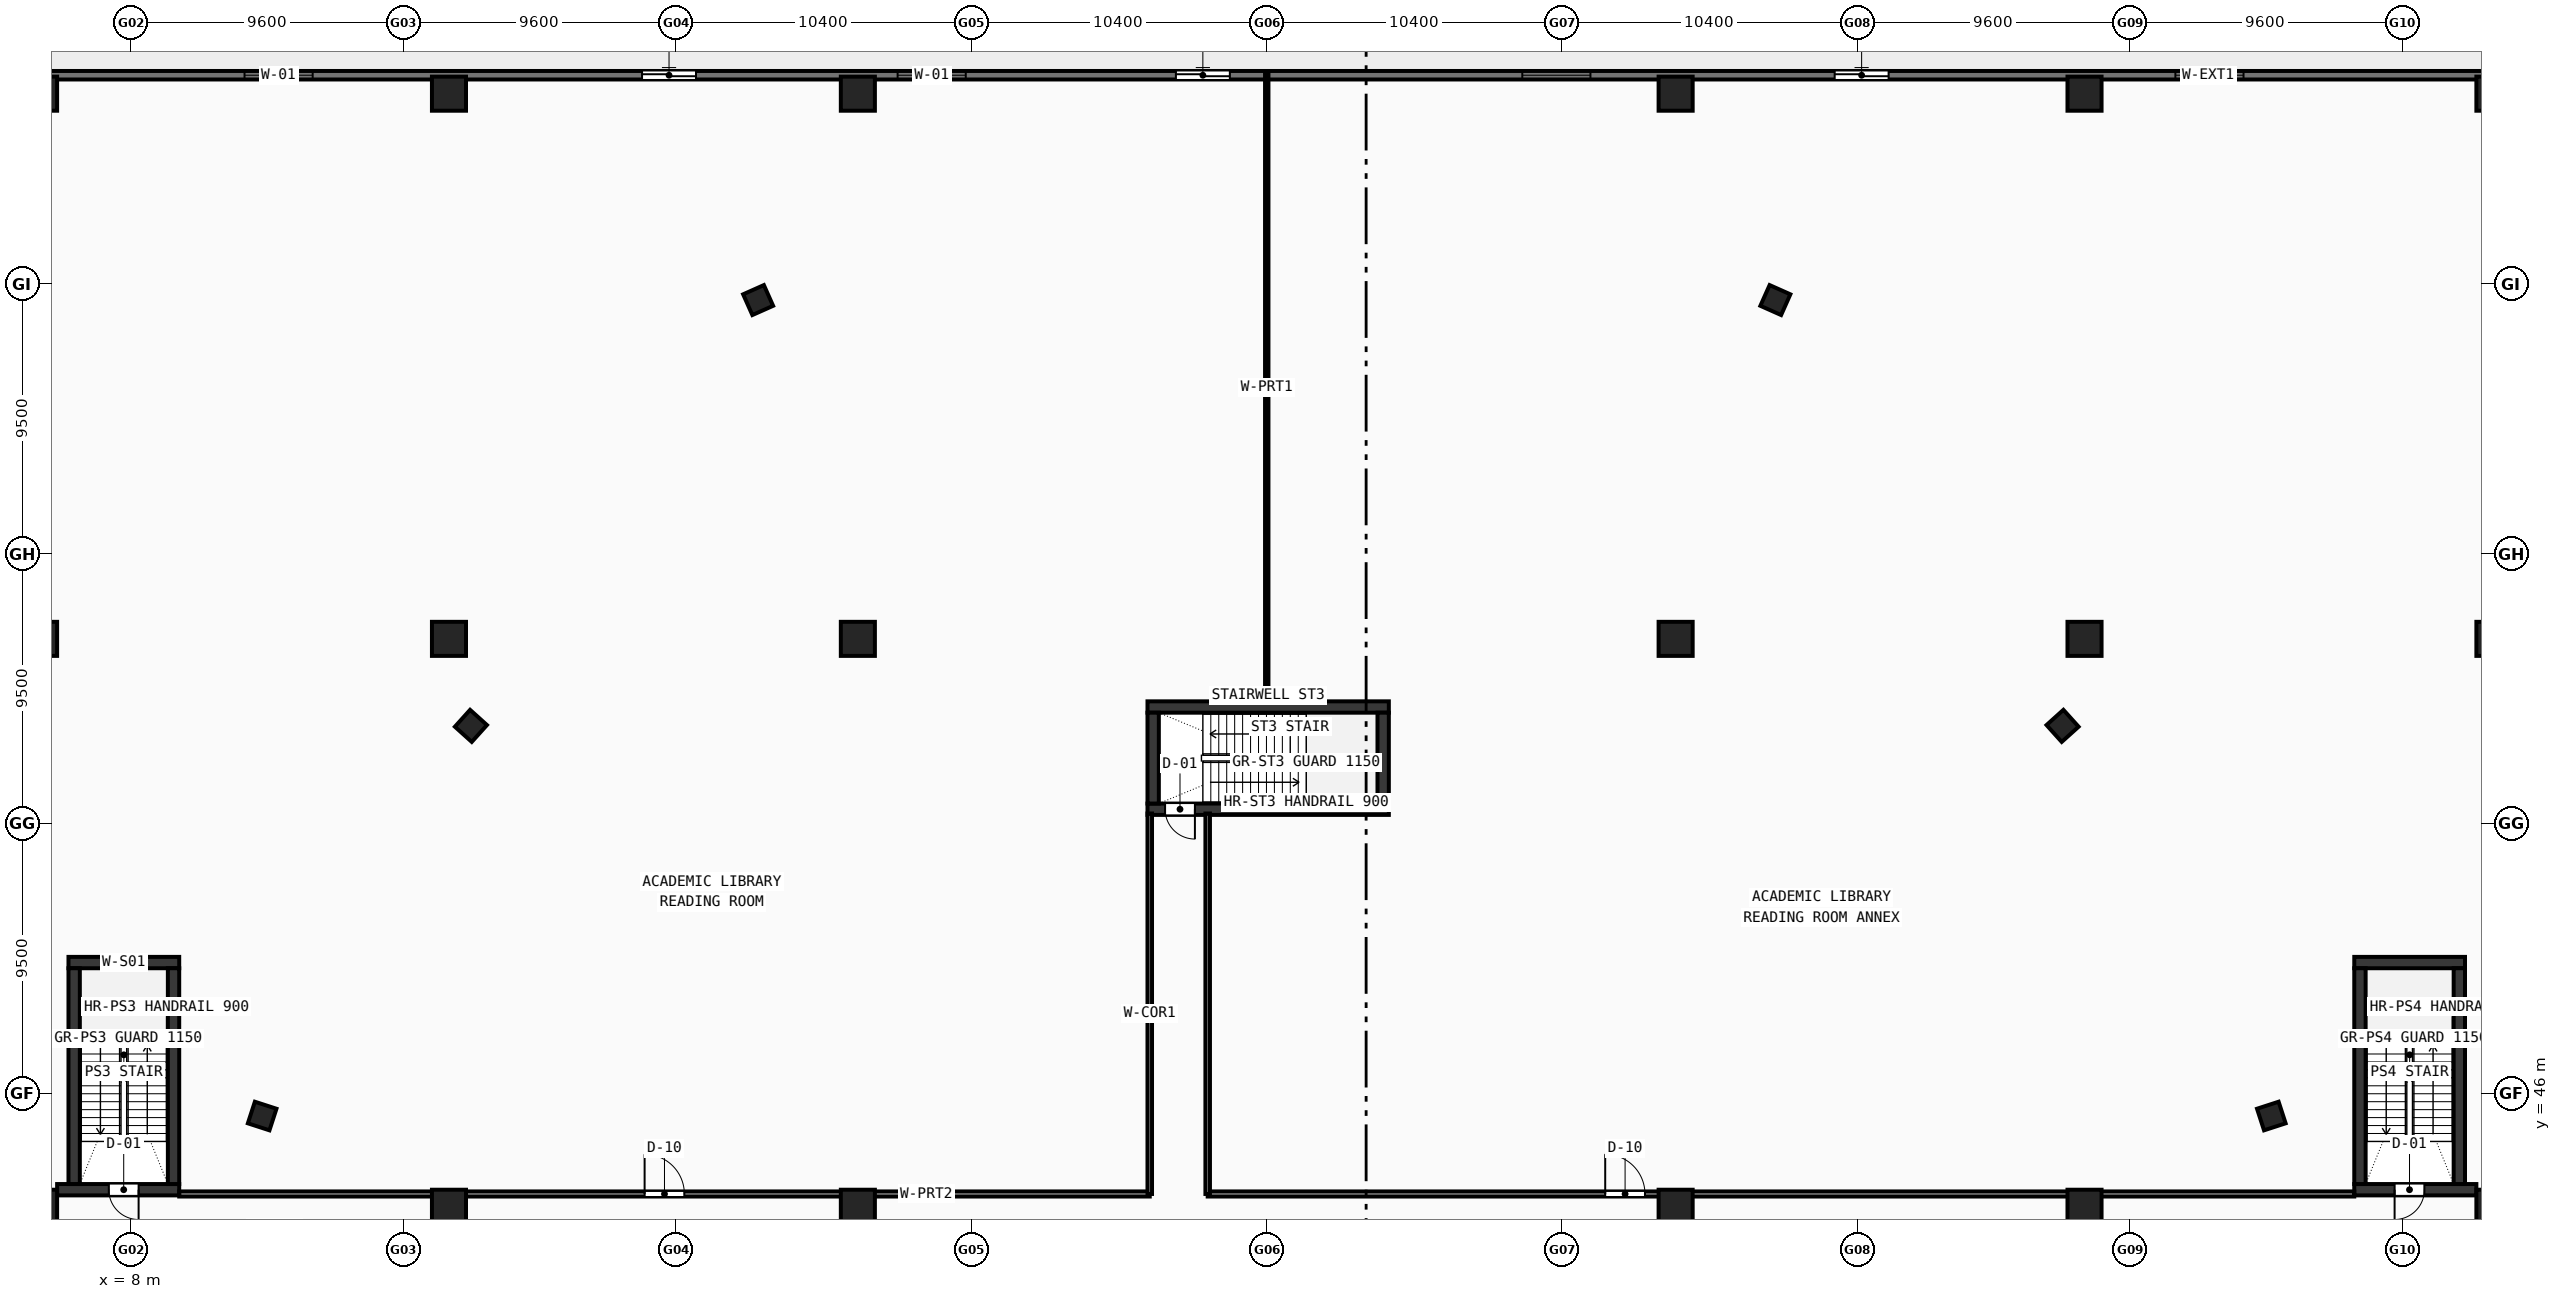
"""IFC4 building model, lengths in metres.
Left out: names, types, materials, properties, quantities, classifications, styles, units other than length and angle.
Written with IfcOpenShell. Run it as: python <this file> out.ifc"""

import sys

from ifc_helpers import new_model, si_unit, direction, frame, frame_2d, origin, origin_with_axes, origin_2d, place, context, subcontext, project, spatial, rectangle, hollow_rectangle, extrude, source, transform, mapped, element, fill, save


model = new_model("IFC4")
c1 = context("Model", 3, precision=1e-05, world=origin(), true_north=direction((0.0, 1.0)))
c2 = subcontext(c1, "Body", "Model", "MODEL_VIEW")
j1 = project(units=[si_unit("LENGTHUNIT", "METRE"), si_unit("PLANEANGLEUNIT", "RADIAN")], contexts=[c1])
p1 = place(None, origin())
s1 = spatial("IfcSite", under=j1, at=p1, CompositionType="ELEMENT")
p2 = place(p1, origin())
s2 = spatial("IfcBuilding", under=s1, at=p2, CompositionType="ELEMENT")
p3 = place(p2, frame((0.0, 0.0, 9.6)))
s3 = spatial("IfcBuildingStorey", under=s2, at=p3, CompositionType="ELEMENT", Elevation=9.6)
p4 = place(p3, frame((5.8, 50.6, 0.0), z_axis=(0.0, 0.0, 1.0), x_axis=(1.0, 0.0, 0.0)))
e1 = element("IfcWall", 1, at=p4, inside=s3, PredefinedType="SHEAR", context=c2, shape_type="SweptSolid", body=[
    extrude(rectangle(XDim=3.9, YDim=0.4, at=frame_2d((1.95, 0.0))), origin(), (0.0, 0.0, 1.0), 4.52),
])
p5 = place(p3, frame((5.4, 42.6, 0.0), z_axis=(0.0, 0.0, 1.0), x_axis=(1.0, 0.0, 0.0)))
e2 = element("IfcWall", 2, at=p5, inside=s3, PredefinedType="SHEAR", context=c2, shape_type="SweptSolid", body=[
    extrude(rectangle(XDim=4.3, YDim=0.4, at=frame_2d((2.15, 0.0))), origin(), (0.0, 0.0, 1.0), 4.52),
])
p6 = place(p5, frame((1.82, 0.0, 0.0)))
e3 = element("IfcOpeningElement", 3, at=p6, cuts=e2, PredefinedType="OPENING", context=c2, shape_type="SweptSolid", body=[
    extrude(rectangle(XDim=1.05, YDim=2.1, at=frame_2d((0.525, 1.05))), frame((0.0, 0.21, 0.0), z_axis=(0.0, -1.0, 0.0), x_axis=(1.0, 0.0, 0.0)), (0.0, 0.0, 1.0), 0.42),
])
for number, where, z_axis, x_axis in (
    (4, (6.0, 42.8, 0.0), (0.0, 0.0, 1.0), (0.0, 1.0, 0.0)),
    (5, (9.5, 42.8, 0.0), (0.0, 0.0, 1.0), (0.0, 1.0, 0.0)),
):
    element("IfcWall", number, at=place(p3, frame(where, z_axis=z_axis, x_axis=x_axis)), inside=s3, PredefinedType="SHEAR", context=c2, shape_type="SweptSolid", body=[
        extrude(rectangle(XDim=7.6, YDim=0.4, at=frame_2d((3.8, 0.0))), origin(), (0.0, 0.0, 1.0), 4.52),
    ])
p7 = place(p3, frame((86.3, 50.6, 0.0), z_axis=(0.0, 0.0, 1.0), x_axis=(1.0, 0.0, 0.0)))
e6 = element("IfcWall", 6, at=p7, inside=s3, PredefinedType="SHEAR", context=c2, shape_type="SweptSolid", body=[
    extrude(rectangle(XDim=3.9, YDim=0.4, at=frame_2d((1.95, 0.0))), origin(), (0.0, 0.0, 1.0), 4.52),
])
p8 = place(p3, frame((86.3, 42.6, 0.0), z_axis=(0.0, 0.0, 1.0), x_axis=(1.0, 0.0, 0.0)))
e7 = element("IfcWall", 7, at=p8, inside=s3, PredefinedType="SHEAR", context=c2, shape_type="SweptSolid", body=[
    extrude(rectangle(XDim=4.3, YDim=0.4, at=frame_2d((2.15, 0.0))), origin(), (0.0, 0.0, 1.0), 4.52),
])
p9 = place(p8, frame((1.42, 0.0, 0.0)))
e8 = element("IfcOpeningElement", 8, at=p9, cuts=e7, PredefinedType="OPENING", context=c2, shape_type="SweptSolid", body=[
    extrude(rectangle(XDim=1.05, YDim=2.1, at=frame_2d((0.525, 1.05))), frame((0.0, 0.21, 0.0), z_axis=(0.0, -1.0, 0.0), x_axis=(1.0, 0.0, 0.0)), (0.0, 0.0, 1.0), 0.42),
])
for number, where, z_axis, x_axis in (
    (9, (86.5, 42.8, 0.0), (0.0, 0.0, 1.0), (0.0, 1.0, 0.0)),
    (10, (90.0, 42.8, 0.0), (0.0, 0.0, 1.0), (0.0, 1.0, 0.0)),
):
    element("IfcWall", number, at=place(p3, frame(where, z_axis=z_axis, x_axis=x_axis)), inside=s3, PredefinedType="SHEAR", context=c2, shape_type="SweptSolid", body=[
        extrude(rectangle(XDim=7.6, YDim=0.4, at=frame_2d((3.8, 0.0))), origin(), (0.0, 0.0, 1.0), 4.52),
    ])
p10 = place(p3, frame((43.8, 59.6, 0.0), z_axis=(0.0, 0.0, 1.0), x_axis=(1.0, 0.0, 0.0)))
e11 = element("IfcWall", 11, at=p10, inside=s3, PredefinedType="SHEAR", context=c2, shape_type="SweptSolid", body=[
    extrude(rectangle(XDim=8.5, YDim=0.4, at=frame_2d((4.25, 0.0))), origin(), (0.0, 0.0, 1.0), 4.52),
])
p11 = place(p3, frame((43.8, 56.0, 0.0), z_axis=(0.0, 0.0, 1.0), x_axis=(1.0, 0.0, 0.0)))
e12 = element("IfcWall", 12, at=p11, inside=s3, PredefinedType="SHEAR", context=c2, shape_type="SweptSolid", body=[
    extrude(rectangle(XDim=8.5, YDim=0.4, at=frame_2d((4.25, 0.0))), origin(), (0.0, 0.0, 1.0), 4.52),
])
p12 = place(p11, frame((0.62, 0.0, 0.0)))
e13 = element("IfcOpeningElement", 13, at=p12, cuts=e12, PredefinedType="OPENING", context=c2, shape_type="SweptSolid", body=[
    extrude(rectangle(XDim=1.05, YDim=2.1, at=frame_2d((0.525, 1.05))), frame((0.0, 0.21, 0.0), z_axis=(0.0, -1.0, 0.0), x_axis=(1.0, 0.0, 0.0)), (0.0, 0.0, 1.0), 0.42),
])
for number, where, z_axis, x_axis in (
    (14, (44.0, 56.2, 0.0), (0.0, 0.0, 1.0), (0.0, 1.0, 0.0)),
    (15, (52.1, 56.2, 0.0), (0.0, 0.0, 1.0), (0.0, 1.0, 0.0)),
):
    element("IfcWall", number, at=place(p3, frame(where, z_axis=z_axis, x_axis=x_axis)), inside=s3, PredefinedType="SHEAR", context=c2, shape_type="SweptSolid", body=[
        extrude(rectangle(XDim=3.2, YDim=0.4, at=frame_2d((1.6, 0.0))), origin(), (0.0, 0.0, 1.0), 4.52),
    ])
m1 = source(origin(), c2, "Body", "SweptSolid", [
    extrude(hollow_rectangle(XDim=1.2, YDim=1.2, WallThickness=0.05, at=origin_2d()), origin(), (0.0, 0.0, 1.0), 4.8),
])
for number, where, z_axis, x_axis in (
    (16, (4.8, 42.0, -0.28), (0.0, 0.0, 1.0), (1.0, 0.0, 0.0)),
    (17, (4.8, 62.0, -0.28), (0.0, 0.0, 1.0), (1.0, 0.0, 0.0)),
    (18, (4.8, 81.2, -0.28), (0.0, 0.0, 1.0), (1.0, 0.0, 0.0)),
    (19, (19.2, 42.0, -0.28), (0.0, 0.0, 1.0), (1.0, 0.0, 0.0)),
    (20, (19.2, 62.0, -0.28), (0.0, 0.0, 1.0), (1.0, 0.0, 0.0)),
    (21, (19.2, 81.2, -0.28), (0.0, 0.0, 1.0), (1.0, 0.0, 0.0)),
    (22, (33.6, 42.0, -0.28), (0.0, 0.0, 1.0), (1.0, 0.0, 0.0)),
    (23, (33.6, 62.0, -0.28), (0.0, 0.0, 1.0), (1.0, 0.0, 0.0)),
    (24, (33.6, 81.2, -0.28), (0.0, 0.0, 1.0), (1.0, 0.0, 0.0)),
    (25, (62.4, 42.0, -0.28), (0.0, 0.0, 1.0), (1.0, 0.0, 0.0)),
    (26, (62.4, 62.0, -0.28), (0.0, 0.0, 1.0), (1.0, 0.0, 0.0)),
    (27, (62.4, 81.2, -0.28), (0.0, 0.0, 1.0), (1.0, 0.0, 0.0)),
    (28, (76.8, 42.0, -0.28), (0.0, 0.0, 1.0), (1.0, 0.0, 0.0)),
    (29, (76.8, 62.0, -0.28), (0.0, 0.0, 1.0), (1.0, 0.0, 0.0)),
    (30, (76.8, 81.2, -0.28), (0.0, 0.0, 1.0), (1.0, 0.0, 0.0)),
    (31, (91.2, 42.0, -0.28), (0.0, 0.0, 1.0), (1.0, 0.0, 0.0)),
    (32, (91.2, 62.0, -0.28), (0.0, 0.0, 1.0), (1.0, 0.0, 0.0)),
    (33, (91.2, 81.2, -0.28), (0.0, 0.0, 1.0), (1.0, 0.0, 0.0)),
):
    element("IfcColumn", number, at=place(p3, frame(where, z_axis=z_axis, x_axis=x_axis)), inside=s3, PredefinedType="COLUMN", context=c2, shape_type="MappedRepresentation", body=[
        mapped(m1, transform((0.0, 0.0, 0.0), scale=1.0)),
    ])
m2 = source(origin(), c2, "Body", "SweptSolid", [
    extrude(hollow_rectangle(XDim=0.8, YDim=0.8, WallThickness=0.032, at=origin_2d()), origin(), (0.0, 0.0, 1.0), 4.8),
])
for number, where, z_axis, x_axis in (
    (34, (83.379, 45.196, -0.28), (0.0, 0.0, 1.0), (-0.309, 0.951, 0.0)),
    (35, (76.027, 58.935, -0.28), (0.0, 0.0, 1.0), (-0.669, 0.743, 0.0)),
    (36, (65.913, 73.932, -0.28), (0.0, 0.0, 1.0), (-0.914, 0.407, 0.0)),
    (37, (30.088, 73.932, -0.28), (0.0, 0.0, 1.0), (-0.914, -0.407, 0.0)),
    (38, (19.973, 58.935, -0.28), (0.0, 0.0, 1.0), (-0.669, -0.743, 0.0)),
    (39, (12.621, 45.196, -0.28), (0.0, 0.0, 1.0), (-0.309, -0.951, 0.0)),
):
    element("IfcColumn", number, at=place(p3, frame(where, z_axis=z_axis, x_axis=x_axis)), inside=s3, PredefinedType="COLUMN", context=c2, shape_type="MappedRepresentation", body=[
        mapped(m2, transform((0.0, 0.0, 0.0), scale=1.0)),
    ])
p13 = place(p3, frame((4.0, 81.85, 0.0), z_axis=(0.0, 0.0, 1.0), x_axis=(1.0, 0.0, 0.0)))
e40 = element("IfcWall", 40, at=p13, inside=s3, PredefinedType="STANDARD", context=c2, shape_type="SweptSolid", body=[
    extrude(rectangle(XDim=88.0, YDim=0.3, at=frame_2d((44.0, 0.0))), origin(), (0.0, 0.0, 1.0), 4.52),
])
p14 = place(p13, frame((22.0, 0.0, 0.0)))
e41 = element("IfcOpeningElement", 41, at=p14, cuts=e40, PredefinedType="OPENING", context=c2, shape_type="SweptSolid", body=[
    extrude(rectangle(XDim=1.9, YDim=2.2, at=frame_2d((0.95, 1.1))), frame((0.0, 0.16, 0.0), z_axis=(0.0, -1.0, 0.0), x_axis=(1.0, 0.0, 0.0)), (0.0, 0.0, 1.0), 0.32),
])
p15 = place(p13, frame((40.8, 0.0, 0.0)))
e42 = element("IfcOpeningElement", 42, at=p15, cuts=e40, PredefinedType="OPENING", context=c2, shape_type="SweptSolid", body=[
    extrude(rectangle(XDim=1.9, YDim=2.2, at=frame_2d((0.95, 1.1))), frame((0.0, 0.16, 0.0), z_axis=(0.0, -1.0, 0.0), x_axis=(1.0, 0.0, 0.0)), (0.0, 0.0, 1.0), 0.32),
])
p16 = place(p13, frame((64.0, 0.0, 0.0)))
e43 = element("IfcOpeningElement", 43, at=p16, cuts=e40, PredefinedType="OPENING", context=c2, shape_type="SweptSolid", body=[
    extrude(rectangle(XDim=1.9, YDim=2.2, at=frame_2d((0.95, 1.1))), frame((0.0, 0.16, 0.0), z_axis=(0.0, -1.0, 0.0), x_axis=(1.0, 0.0, 0.0)), (0.0, 0.0, 1.0), 0.32),
])
p17 = place(p13, frame((8.0, 0.0, 0.9)))
e44 = element("IfcOpeningElement", 44, at=p17, cuts=e40, PredefinedType="OPENING", context=c2, shape_type="SweptSolid", body=[
    extrude(rectangle(XDim=2.4, YDim=1.8, at=frame_2d((1.2, 0.9))), frame((0.0, 0.16, 0.0), z_axis=(0.0, -1.0, 0.0), x_axis=(1.0, 0.0, 0.0)), (0.0, 0.0, 1.0), 0.32),
])
p18 = place(p13, frame((31.0, 0.0, 0.9)))
e45 = element("IfcOpeningElement", 45, at=p18, cuts=e40, PredefinedType="OPENING", context=c2, shape_type="SweptSolid", body=[
    extrude(rectangle(XDim=2.4, YDim=1.8, at=frame_2d((1.2, 0.9))), frame((0.0, 0.16, 0.0), z_axis=(0.0, -1.0, 0.0), x_axis=(1.0, 0.0, 0.0)), (0.0, 0.0, 1.0), 0.32),
])
p19 = place(p13, frame((53.0, 0.0, 0.9)))
e46 = element("IfcOpeningElement", 46, at=p19, cuts=e40, PredefinedType="OPENING", context=c2, shape_type="SweptSolid", body=[
    extrude(rectangle(XDim=2.4, YDim=1.8, at=frame_2d((1.2, 0.9))), frame((0.0, 0.16, 0.0), z_axis=(0.0, -1.0, 0.0), x_axis=(1.0, 0.0, 0.0)), (0.0, 0.0, 1.0), 0.32),
])
p20 = place(p13, frame((76.0, 0.0, 0.9)))
e47 = element("IfcOpeningElement", 47, at=p20, cuts=e40, PredefinedType="OPENING", context=c2, shape_type="SweptSolid", body=[
    extrude(rectangle(XDim=2.4, YDim=1.8, at=frame_2d((1.2, 0.9))), frame((0.0, 0.16, 0.0), z_axis=(0.0, -1.0, 0.0), x_axis=(1.0, 0.0, 0.0)), (0.0, 0.0, 1.0), 0.32),
])
p21 = place(p3, frame((9.7, 42.45, 0.0), z_axis=(0.0, 0.0, 1.0), x_axis=(1.0, 0.0, 0.0)))
e48 = element("IfcWall", 48, at=p21, inside=s3, PredefinedType="PARTITIONING", context=c2, shape_type="SweptSolid", body=[
    extrude(rectangle(XDim=34.18, YDim=0.18, at=frame_2d((17.09, 0.0))), origin(), (0.0, 0.0, 1.0), 3.62),
])
p22 = place(p21, frame((16.39, 0.0, 0.0)))
e49 = element("IfcOpeningElement", 49, at=p22, cuts=e48, PredefinedType="OPENING", context=c2, shape_type="SweptSolid", body=[
    extrude(rectangle(XDim=1.4, YDim=2.15, at=frame_2d((0.7, 1.075))), frame((0.0, 0.1, 0.0), z_axis=(0.0, -1.0, 0.0), x_axis=(1.0, 0.0, 0.0)), (0.0, 0.0, 1.0), 0.2),
])
p23 = place(p3, frame((45.92, 42.45, 0.0), z_axis=(0.0, 0.0, 1.0), x_axis=(1.0, 0.0, 0.0)))
e50 = element("IfcWall", 50, at=p23, inside=s3, PredefinedType="PARTITIONING", context=c2, shape_type="SweptSolid", body=[
    extrude(rectangle(XDim=40.38, YDim=0.18, at=frame_2d((20.19, 0.0))), origin(), (0.0, 0.0, 1.0), 3.62),
])
p24 = place(p23, frame((14.0, 0.0, 0.0)))
e51 = element("IfcOpeningElement", 51, at=p24, cuts=e50, PredefinedType="OPENING", context=c2, shape_type="SweptSolid", body=[
    extrude(rectangle(XDim=1.4, YDim=2.15, at=frame_2d((0.7, 1.075))), frame((0.0, 0.1, 0.0), z_axis=(0.0, -1.0, 0.0), x_axis=(1.0, 0.0, 0.0)), (0.0, 0.0, 1.0), 0.2),
])
for number, where, z_axis, x_axis in (
    (52, (43.88, 42.45, 0.0), (0.0, 0.0, 1.0), (0.0, 1.0, 0.0)),
    (53, (45.92, 42.45, 0.0), (0.0, 0.0, 1.0), (0.0, 1.0, 0.0)),
):
    element("IfcWall", number, at=place(p3, frame(where, z_axis=z_axis, x_axis=x_axis)), inside=s3, PredefinedType="PARTITIONING", context=c2, shape_type="SweptSolid", body=[
        extrude(rectangle(XDim=13.4, YDim=0.16, at=frame_2d((6.7, 0.0))), origin(), (0.0, 0.0, 1.0), 4.12),
    ])
p25 = place(p3, frame((48.0, 59.8, 0.0), z_axis=(0.0, 0.0, 1.0), x_axis=(0.0, 1.0, 0.0)))
e54 = element("IfcWall", 54, at=p25, inside=s3, PredefinedType="PARTITIONING", context=c2, shape_type="SweptSolid", body=[
    extrude(rectangle(XDim=22.1, YDim=0.12, at=frame_2d((11.05, 0.0))), origin(), (0.0, 0.0, 1.0), 3.62),
])
m3 = source(origin(), c2, "Body", "SweptSolid", [
    extrude(rectangle(XDim=1.9, YDim=2.2, at=frame_2d((0.95, 1.1))), frame((0.0, 0.025, 0.0), z_axis=(0.0, -1.0, 0.0), x_axis=(1.0, 0.0, 0.0)), (0.0, 0.0, 1.0), 0.05),
])
p26 = place(p14, origin_with_axes())
e55 = element("IfcDoor", 55, at=p26, inside=s3, OperationType="DOUBLE_DOOR_SLIDING", PredefinedType="DOOR", context=c2, shape_type="MappedRepresentation", body=[
    mapped(m3, transform((0.0, 0.0, 0.0), scale=1.0)),
])
fill(e41, e55)
p27 = place(p15, origin_with_axes())
e56 = element("IfcDoor", 56, at=p27, inside=s3, OperationType="DOUBLE_DOOR_SLIDING", PredefinedType="DOOR", context=c2, shape_type="MappedRepresentation", body=[
    mapped(m3, transform((0.0, 0.0, 0.0), scale=1.0)),
])
fill(e42, e56)
p28 = place(p16, origin_with_axes())
e57 = element("IfcDoor", 57, at=p28, inside=s3, OperationType="DOUBLE_DOOR_SLIDING", PredefinedType="DOOR", context=c2, shape_type="MappedRepresentation", body=[
    mapped(m3, transform((0.0, 0.0, 0.0), scale=1.0)),
])
fill(e43, e57)
m4 = source(origin(), c2, "Body", "SweptSolid", [
    extrude(rectangle(XDim=2.4, YDim=1.8, at=frame_2d((1.2, 0.9))), frame((0.0, 0.03, 0.0), z_axis=(0.0, -1.0, 0.0), x_axis=(1.0, 0.0, 0.0)), (0.0, 0.0, 1.0), 0.06),
])
p29 = place(p17, origin_with_axes())
e58 = element("IfcWindow", 58, at=p29, inside=s3, PartitioningType="SINGLE_PANEL", PredefinedType="WINDOW", context=c2, shape_type="MappedRepresentation", body=[
    mapped(m4, transform((0.0, 0.0, 0.0), scale=1.0)),
])
fill(e44, e58)
p30 = place(p18, origin_with_axes())
e59 = element("IfcWindow", 59, at=p30, inside=s3, PartitioningType="SINGLE_PANEL", PredefinedType="WINDOW", context=c2, shape_type="MappedRepresentation", body=[
    mapped(m4, transform((0.0, 0.0, 0.0), scale=1.0)),
])
fill(e45, e59)
p31 = place(p19, origin_with_axes())
e60 = element("IfcWindow", 60, at=p31, inside=s3, PartitioningType="SINGLE_PANEL", PredefinedType="WINDOW", context=c2, shape_type="MappedRepresentation", body=[
    mapped(m4, transform((0.0, 0.0, 0.0), scale=1.0)),
])
fill(e46, e60)
p32 = place(p20, origin_with_axes())
e61 = element("IfcWindow", 61, at=p32, inside=s3, PartitioningType="SINGLE_PANEL", PredefinedType="WINDOW", context=c2, shape_type="MappedRepresentation", body=[
    mapped(m4, transform((0.0, 0.0, 0.0), scale=1.0)),
])
fill(e47, e61)
m5 = source(origin(), c2, "Body", "SweptSolid", [
    extrude(rectangle(XDim=1.05, YDim=2.1, at=frame_2d((0.525, 1.05))), frame((0.0, 0.025, 0.0), z_axis=(0.0, -1.0, 0.0), x_axis=(1.0, 0.0, 0.0)), (0.0, 0.0, 1.0), 0.05),
])
p33 = place(p6, frame((1.05, 0.0, 0.0), z_axis=(0.0, 0.0, 1.0), x_axis=(-1.0, 0.0, 0.0)))
e62 = element("IfcDoor", 62, at=p33, inside=s3, OperationType="SINGLE_SWING_LEFT", PredefinedType="DOOR", context=c2, shape_type="MappedRepresentation", body=[
    mapped(m5, transform((0.0, 0.0, 0.0), scale=1.0)),
])
fill(e3, e62)
p34 = place(p9, frame((1.05, 0.0, 0.0), z_axis=(0.0, 0.0, 1.0), x_axis=(-1.0, 0.0, 0.0)))
e63 = element("IfcDoor", 63, at=p34, inside=s3, OperationType="SINGLE_SWING_RIGHT", PredefinedType="DOOR", context=c2, shape_type="MappedRepresentation", body=[
    mapped(m5, transform((0.0, 0.0, 0.0), scale=1.0)),
])
fill(e8, e63)
p35 = place(p12, frame((1.05, 0.0, 0.0), z_axis=(0.0, 0.0, 1.0), x_axis=(-1.0, 0.0, 0.0)))
e64 = element("IfcDoor", 64, at=p35, inside=s3, OperationType="SINGLE_SWING_LEFT", PredefinedType="DOOR", context=c2, shape_type="MappedRepresentation", body=[
    mapped(m5, transform((0.0, 0.0, 0.0), scale=1.0)),
])
fill(e13, e64)
m6 = source(origin(), c2, "Body", "SweptSolid", [
    extrude(rectangle(XDim=1.4, YDim=2.15, at=frame_2d((0.7, 1.075))), frame((0.0, 0.025, 0.0), z_axis=(0.0, -1.0, 0.0), x_axis=(1.0, 0.0, 0.0)), (0.0, 0.0, 1.0), 0.05),
])
p36 = place(p22, origin_with_axes())
e65 = element("IfcDoor", 65, at=p36, inside=s3, OperationType="SINGLE_SWING_LEFT", PredefinedType="DOOR", context=c2, shape_type="MappedRepresentation", body=[
    mapped(m6, transform((0.0, 0.0, 0.0), scale=1.0)),
])
fill(e49, e65)
p37 = place(p24, origin_with_axes())
e66 = element("IfcDoor", 66, at=p37, inside=s3, OperationType="SINGLE_SWING_LEFT", PredefinedType="DOOR", context=c2, shape_type="MappedRepresentation", body=[
    mapped(m6, transform((0.0, 0.0, 0.0), scale=1.0)),
])
fill(e51, e66)
save(model, sys.argv[1])
